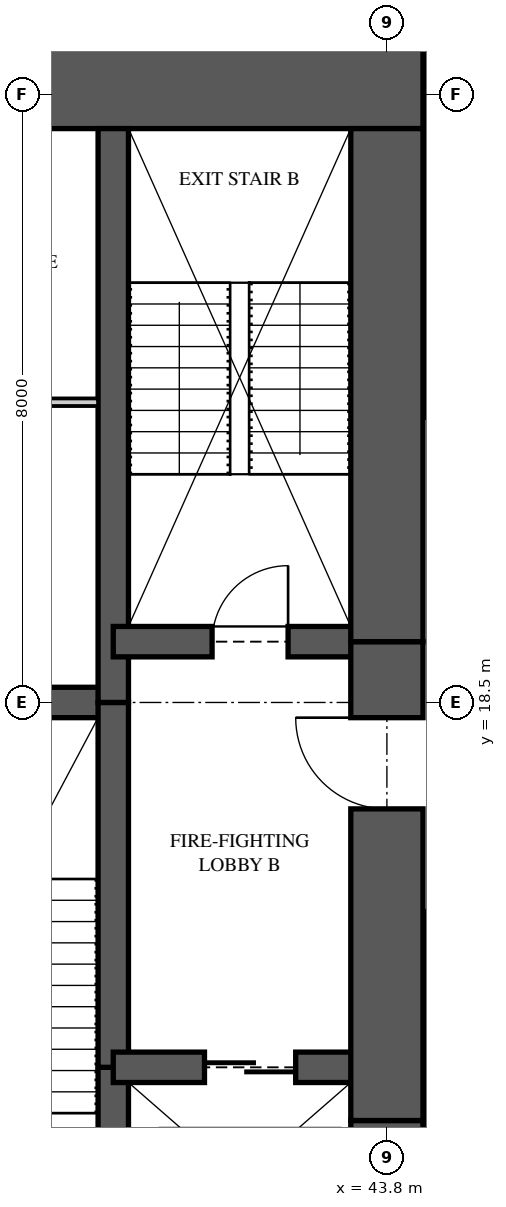
"""IFC4 building model, lengths in metres.
Left out: names, types, materials, properties, quantities, classifications, styles, units other than length and angle.
Written with IfcOpenShell. Run it as: python <this file> out.ifc"""

import sys

from ifc_helpers import new_model, si_unit, direction, frame, frame_2d, origin, place, context, subcontext, project, spatial, rectangle, extrude, element, fill, save


model = new_model("IFC4")
c1 = context("Model", 3, precision=1e-05, world=origin(), true_north=direction((0.0, 1.0)))
c2 = subcontext(c1, "Body", "Model", "MODEL_VIEW")
j1 = project(units=[si_unit("LENGTHUNIT", "METRE"), si_unit("PLANEANGLEUNIT", "RADIAN")], contexts=[c1])
p1 = place(None, origin())
s1 = spatial("IfcSite", under=j1, at=p1, CompositionType="ELEMENT")
p2 = place(p1, origin())
s2 = spatial("IfcBuilding", under=s1, at=p2, CompositionType="ELEMENT")
p3 = place(p2, frame((0.0, 0.0, 54.5)))
s3 = spatial("IfcBuildingStorey", under=s2, at=p3, CompositionType="ELEMENT", Elevation=54.5)
p4 = place(p3, frame((44.275, 26.875, 0.0), z_axis=(0.0, 0.0, 1.0), x_axis=(-1.0, 0.0, 0.0)))
e1 = element("IfcWall", 1, at=p4, inside=s3, PredefinedType="SHEAR", context=c2, shape_type="SweptSolid", body=[
    extrude(rectangle(XDim=8.375, YDim=1.65, at=frame_2d((4.188, 0.0))), origin(), (0.0, 0.0, 1.0), 3.35),
])
p5 = place(p4, frame((5.775, 0.0, 0.0)))
e2 = element("IfcOpeningElement", 2, at=p5, cuts=e1, PredefinedType="OPENING", context=c2, shape_type="SweptSolid", body=[
    extrude(rectangle(XDim=0.9, YDim=2.1, at=frame_2d((0.45, 1.05))), frame((0.0, 0.835, 0.0), z_axis=(0.0, -1.0, 0.0), x_axis=(1.0, 0.0, 0.0)), (0.0, 0.0, 1.0), 1.67),
])
p6 = place(p3, frame((43.8, 10.95, 0.0), z_axis=(0.0, 0.0, 1.0), x_axis=(0.0, 1.0, 0.0)))
e3 = element("IfcWall", 3, at=p6, inside=s3, PredefinedType="SHEAR", context=c2, shape_type="SweptSolid", body=[
    extrude(rectangle(XDim=2.05, YDim=0.95, at=frame_2d((1.025, 0.0))), origin(), (0.0, 0.0, 1.0), 3.35),
])
p7 = place(p3, frame((43.8, 13.0, 0.0), z_axis=(0.0, 0.0, 1.0), x_axis=(0.0, 1.0, 0.0)))
e4 = element("IfcWall", 4, at=p7, inside=s3, PredefinedType="SHEAR", context=c2, shape_type="SweptSolid", body=[
    extrude(rectangle(XDim=6.3, YDim=0.95, at=frame_2d((3.15, 0.0))), origin(), (0.0, 0.0, 1.0), 3.35),
])
p8 = place(p7, frame((4.1, 0.0, 0.0)))
e5 = element("IfcOpeningElement", 5, at=p8, cuts=e4, PredefinedType="OPENING", context=c2, shape_type="SweptSolid", body=[
    extrude(rectangle(XDim=1.2, YDim=2.2, at=frame_2d((0.6, 1.1))), frame((0.0, 0.485, 0.0), z_axis=(0.0, -1.0, 0.0), x_axis=(1.0, 0.0, 0.0)), (0.0, 0.0, 1.0), 0.97),
])
p9 = place(p3, frame((43.8, 19.3, 0.0), z_axis=(0.0, 0.0, 1.0), x_axis=(0.0, 1.0, 0.0)))
e6 = element("IfcWall", 6, at=p9, inside=s3, PredefinedType="SHEAR", context=c2, shape_type="SweptSolid", body=[
    extrude(rectangle(XDim=6.75, YDim=0.95, at=frame_2d((3.375, 0.0))), origin(), (0.0, 0.0, 1.0), 3.35),
])
p10 = place(p3, frame((40.2, 10.95, 0.0), z_axis=(0.0, 0.0, 1.0), x_axis=(0.0, 1.0, 0.0)))
e7 = element("IfcWall", 7, at=p10, inside=s3, PredefinedType="SHEAR", context=c2, shape_type="SweptSolid", body=[
    extrude(rectangle(XDim=2.75, YDim=0.4, at=frame_2d((1.375, 0.0))), origin(), (0.0, 0.0, 1.0), 3.35),
])
p11 = place(p3, frame((40.2, 13.7, 0.0), z_axis=(0.0, 0.0, 1.0), x_axis=(0.0, 1.0, 0.0)))
e8 = element("IfcWall", 8, at=p11, inside=s3, PredefinedType="SHEAR", context=c2, shape_type="SweptSolid", body=[
    extrude(rectangle(XDim=4.8, YDim=0.4, at=frame_2d((2.4, 0.0))), origin(), (0.0, 0.0, 1.0), 3.35),
])
p12 = place(p3, frame((40.2, 18.5, 0.0), z_axis=(0.0, 0.0, 1.0), x_axis=(0.0, 1.0, 0.0)))
e9 = element("IfcWall", 9, at=p12, inside=s3, PredefinedType="SHEAR", context=c2, shape_type="SweptSolid", body=[
    extrude(rectangle(XDim=7.55, YDim=0.4, at=frame_2d((3.775, 0.0))), origin(), (0.0, 0.0, 1.0), 3.35),
])
p13 = place(p3, frame((35.9, 18.5, 0.0), z_axis=(0.0, 0.0, 1.0), x_axis=(1.0, 0.0, 0.0)))
e10 = element("IfcWall", 10, at=p13, inside=s3, PredefinedType="SHEAR", context=c2, shape_type="SweptSolid", body=[
    extrude(rectangle(XDim=4.3, YDim=0.4, at=frame_2d((2.15, 0.0))), origin(), (0.0, 0.0, 1.0), 3.35),
])
p14 = place(p3, frame((40.2, 13.7, 0.0), z_axis=(0.0, 0.0, 1.0), x_axis=(1.0, 0.0, 0.0)))
e11 = element("IfcWall", 11, at=p14, inside=s3, PredefinedType="SHEAR", context=c2, shape_type="SweptSolid", body=[
    extrude(rectangle(XDim=3.6, YDim=0.4, at=frame_2d((1.8, 0.0))), origin(), (0.0, 0.0, 1.0), 3.35),
])
p15 = place(p14, frame((1.2, 0.0, 0.0)))
e12 = element("IfcOpeningElement", 12, at=p15, cuts=e11, PredefinedType="OPENING", context=c2, shape_type="SweptSolid", body=[
    extrude(rectangle(XDim=1.2, YDim=2.1, at=frame_2d((0.6, 1.05))), frame((0.0, 0.21, 0.0), z_axis=(0.0, -1.0, 0.0), x_axis=(1.0, 0.0, 0.0)), (0.0, 0.0, 1.0), 0.42),
])
p16 = place(p3, frame((40.2, 19.3, 0.0), z_axis=(0.0, 0.0, 1.0), x_axis=(1.0, 0.0, 0.0)))
e13 = element("IfcWall", 13, at=p16, inside=s3, PredefinedType="SHEAR", context=c2, shape_type="SweptSolid", body=[
    extrude(rectangle(XDim=3.6, YDim=0.4, at=frame_2d((1.8, 0.0))), origin(), (0.0, 0.0, 1.0), 3.35),
])
p17 = place(p16, frame((1.3, 0.0, 0.0)))
e14 = element("IfcOpeningElement", 14, at=p17, cuts=e13, PredefinedType="OPENING", context=c2, shape_type="SweptSolid", body=[
    extrude(rectangle(XDim=1.0, YDim=2.1, at=frame_2d((0.5, 1.05))), frame((0.0, 0.21, 0.0), z_axis=(0.0, -1.0, 0.0), x_axis=(1.0, 0.0, 0.0)), (0.0, 0.0, 1.0), 0.42),
])
p18 = place(p3, frame((36.1, 22.45, 0.0), z_axis=(0.0, 0.0, 1.0), x_axis=(1.0, 0.0, 0.0)))
e15 = element("IfcWall", 15, at=p18, inside=s3, PredefinedType="PARTITIONING", context=c2, shape_type="SweptSolid", body=[
    extrude(rectangle(XDim=3.9, YDim=0.1, at=frame_2d((1.95, 0.0))), origin(), (0.0, 0.0, 1.0), 3.11),
])
p19 = place(p18, frame((1.5, 0.0, 0.0)))
e16 = element("IfcOpeningElement", 16, at=p19, cuts=e15, PredefinedType="OPENING", context=c2, shape_type="SweptSolid", body=[
    extrude(rectangle(XDim=0.9, YDim=2.1, at=frame_2d((0.45, 1.05))), frame((0.0, 0.06, 0.0), z_axis=(0.0, -1.0, 0.0), x_axis=(1.0, 0.0, 0.0)), (0.0, 0.0, 1.0), 0.12),
])
p20 = place(p17, origin())
e17 = element("IfcDoor", 17, at=p20, inside=s3, OperationType="SINGLE_SWING_RIGHT", PredefinedType="DOOR", context=c2, shape_type="SweptSolid", body=[
    extrude(rectangle(XDim=1.0, YDim=2.1, at=frame_2d((0.5, 1.05))), frame((0.0, 0.025, 0.0), z_axis=(0.0, -1.0, 0.0), x_axis=(1.0, 0.0, 0.0)), (0.0, 0.0, 1.0), 0.05),
])
fill(e14, e17)
p21 = place(p8, origin())
e18 = element("IfcDoor", 18, at=p21, inside=s3, OperationType="SINGLE_SWING_RIGHT", PredefinedType="DOOR", context=c2, shape_type="SweptSolid", body=[
    extrude(rectangle(XDim=1.2, YDim=2.2, at=frame_2d((0.6, 1.1))), frame((0.0, 0.025, 0.0), z_axis=(0.0, -1.0, 0.0), x_axis=(1.0, 0.0, 0.0)), (0.0, 0.0, 1.0), 0.05),
])
fill(e5, e18)
p22 = place(p15, origin())
e19 = element("IfcDoor", 19, at=p22, inside=s3, OperationType="SLIDING_TO_LEFT", PredefinedType="DOOR", context=c2, shape_type="SweptSolid", body=[
    extrude(rectangle(XDim=1.2, YDim=2.1, at=frame_2d((0.6, 1.05))), frame((0.0, 0.025, 0.0), z_axis=(0.0, -1.0, 0.0), x_axis=(1.0, 0.0, 0.0)), (0.0, 0.0, 1.0), 0.05),
])
fill(e12, e19)
save(model, sys.argv[1])
